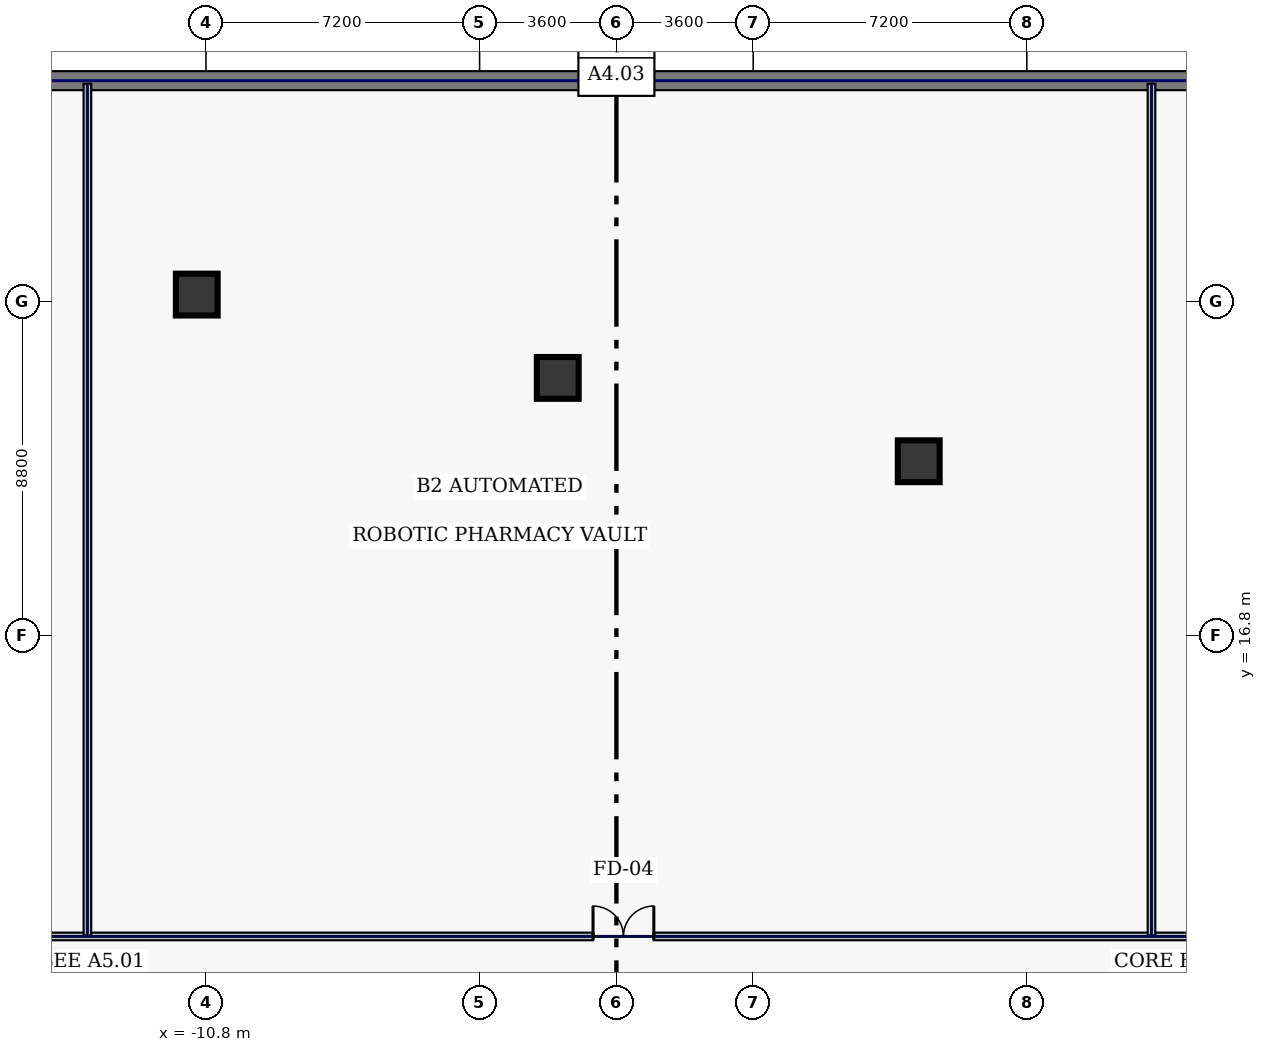
"""IFC4 building model, lengths in metres.
Left out: names, types, materials, properties, quantities, classifications, styles, units other than length and angle.
Written with IfcOpenShell. Run it as: python <this file> out.ifc"""

import sys

from ifc_helpers import new_model, si_unit, direction, frame, frame_2d, origin, origin_2d, place, context, subcontext, project, spatial, rectangle, extrude, element, fill, save


model = new_model("IFC4")
c1 = context("Model", 3, precision=1e-05, world=origin(), true_north=direction((0.0, 1.0)))
c2 = subcontext(c1, "Body", "Model", "MODEL_VIEW")
j1 = project(units=[si_unit("LENGTHUNIT", "METRE"), si_unit("PLANEANGLEUNIT", "RADIAN")], contexts=[c1])
p1 = place(None, origin())
s1 = spatial("IfcSite", under=j1, at=p1, CompositionType="ELEMENT")
p2 = place(p1, origin())
s2 = spatial("IfcBuilding", under=s1, at=p2, CompositionType="ELEMENT")
p3 = place(p2, frame((0.0, 0.0, -10.2)))
s3 = spatial("IfcBuildingStorey", under=s2, at=p3, CompositionType="ELEMENT", Elevation=-10.2)
p4 = place(p3, frame((40.8, 31.4, 0.0), z_axis=(0.0, 0.0, 1.0), x_axis=(-1.0, 0.0, 0.0)))
e1 = element("IfcWall", 1, at=p4, inside=s3, PredefinedType="SHEAR", context=c2, shape_type="SweptSolid", body=[
    extrude(rectangle(XDim=81.6, YDim=0.5, at=frame_2d((40.8, 0.0))), origin(), (0.0, 0.0, 1.0), 4.45),
])
for number, where, z_axis, x_axis in (
    (2, (7.955, 21.385, 0.0), (0.0, 0.0, 1.0), (1.0, 0.0, 0.0)),
    (3, (-1.544, 23.578, 0.0), (0.0, 0.0, 1.0), (1.0, 0.0, 0.0)),
    (4, (-11.042, 25.771, 0.0), (0.0, 0.0, 1.0), (1.0, 0.0, 0.0)),
):
    element("IfcColumn", number, at=place(p3, frame(where, z_axis=z_axis, x_axis=x_axis)), inside=s3, PredefinedType="COLUMN", context=c2, shape_type="SweptSolid", body=[
        extrude(rectangle(XDim=1.1, YDim=1.1, at=origin_2d()), origin(), (0.0, 0.0, 1.0), 4.45),
    ])
p5 = place(p3, frame((-27.895, 8.88, 0.0), z_axis=(0.0, 0.0, 1.0), x_axis=(1.0, 0.0, 0.0)))
e5 = element("IfcWall", 5, at=p5, inside=s3, PredefinedType="SOLIDWALL", context=c2, shape_type="SweptSolid", body=[
    extrude(rectangle(XDim=55.79, YDim=0.2, at=frame_2d((27.895, 0.0))), origin(), (0.0, 0.0, 1.0), 4.45),
])
p6 = place(p5, frame((6.434, 0.0, 0.0)))
e6 = element("IfcOpeningElement", 6, at=p6, cuts=e5, PredefinedType="OPENING", context=c2, shape_type="SweptSolid", body=[
    extrude(rectangle(XDim=1.6, YDim=2.3, at=frame_2d((0.8, 1.15))), frame((0.0, 0.11, 0.0), z_axis=(0.0, -1.0, 0.0), x_axis=(1.0, 0.0, 0.0)), (0.0, 0.0, 1.0), 0.22),
])
p7 = place(p5, frame((27.28, 0.0, 0.0)))
e7 = element("IfcOpeningElement", 7, at=p7, cuts=e5, PredefinedType="OPENING", context=c2, shape_type="SweptSolid", body=[
    extrude(rectangle(XDim=1.6, YDim=2.3, at=frame_2d((0.8, 1.15))), frame((0.0, 0.11, 0.0), z_axis=(0.0, -1.0, 0.0), x_axis=(1.0, 0.0, 0.0)), (0.0, 0.0, 1.0), 0.22),
])
p8 = place(p5, frame((48.046, 0.0, 0.0)))
e8 = element("IfcOpeningElement", 8, at=p8, cuts=e5, PredefinedType="OPENING", context=c2, shape_type="SweptSolid", body=[
    extrude(rectangle(XDim=1.6, YDim=2.3, at=frame_2d((0.8, 1.15))), frame((0.0, 0.11, 0.0), z_axis=(0.0, -1.0, 0.0), x_axis=(1.0, 0.0, 0.0)), (0.0, 0.0, 1.0), 0.22),
])
for number, where, z_axis, x_axis in (
    (9, (-13.92, 8.905, 0.0), (0.0, 0.0, 1.0), (0.0, 1.0, 0.0)),
    (10, (14.08, 8.905, 0.0), (0.0, 0.0, 1.0), (0.0, 1.0, 0.0)),
):
    element("IfcWall", number, at=place(p3, frame(where, z_axis=z_axis, x_axis=x_axis)), inside=s3, PredefinedType="SOLIDWALL", context=c2, shape_type="SweptSolid", body=[
        extrude(rectangle(XDim=22.415, YDim=0.2, at=frame_2d((11.208, 0.0))), origin(), (0.0, 0.0, 1.0), 4.45),
    ])
p9 = place(p7, origin())
e11 = element("IfcDoor", 11, at=p9, inside=s3, OperationType="DOUBLE_SWING_LEFT", PredefinedType="DOOR", context=c2, shape_type="SweptSolid", body=[
    extrude(rectangle(XDim=1.6, YDim=2.3, at=frame_2d((0.8, 1.15))), frame((0.0, 0.025, 0.0), z_axis=(0.0, -1.0, 0.0), x_axis=(1.0, 0.0, 0.0)), (0.0, 0.0, 1.0), 0.05),
])
fill(e7, e11)
save(model, sys.argv[1])
